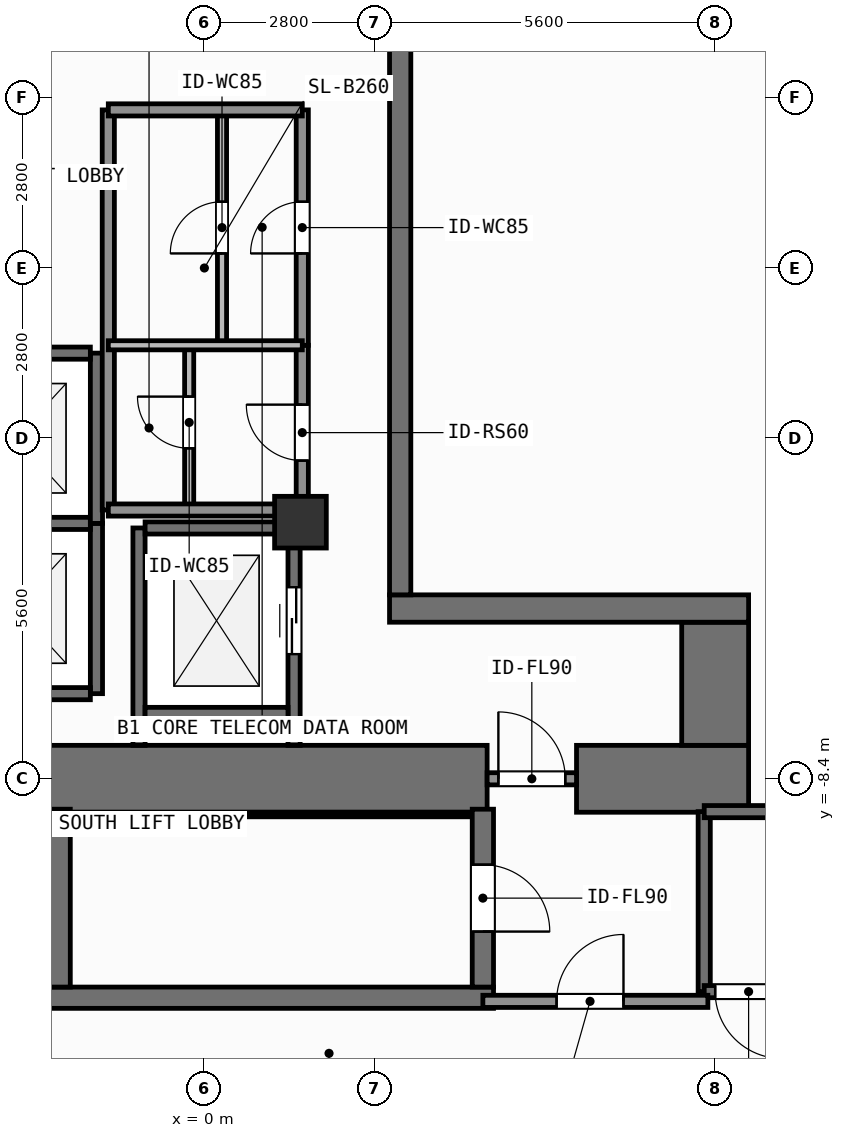
"""IFC4 building model, lengths in metres.
Left out: names, types, materials, properties, quantities, classifications, styles, units other than length and angle.
Written with IfcOpenShell. Run it as: python <this file> out.ifc"""

import sys

from ifc_helpers import new_model, si_unit, direction, frame, frame_2d, origin, origin_2d, place, context, subcontext, project, spatial, rectangle, extrude, element, fill, save


model = new_model("IFC4")
c1 = context("Model", 3, precision=1e-05, world=origin(), true_north=direction((0.0, 1.0)))
c2 = subcontext(c1, "Body", "Model", "MODEL_VIEW")
j1 = project(units=[si_unit("LENGTHUNIT", "METRE"), si_unit("PLANEANGLEUNIT", "RADIAN")], contexts=[c1])
p1 = place(None, origin())
s1 = spatial("IfcSite", under=j1, at=p1, CompositionType="ELEMENT")
p2 = place(p1, origin())
s2 = spatial("IfcBuilding", under=s1, at=p2, CompositionType="ELEMENT")
p3 = place(p2, frame((0.0, 0.0, -4.2)))
s3 = spatial("IfcBuildingStorey", under=s2, at=p3, CompositionType="ELEMENT", Elevation=-4.2)
p4 = place(p3, frame((-2.62, -8.4, 0.0), z_axis=(0.0, 0.0, 1.0), x_axis=(1.0, 0.0, 0.0)))
e1 = element("IfcWall", 1, at=p4, inside=s3, PredefinedType="SHEAR", context=c2, shape_type="SweptSolid", body=[
    extrude(rectangle(XDim=7.27, YDim=1.1, at=frame_2d((3.635, 0.0))), origin(), (0.0, 0.0, 1.0), 4.2),
])
p5 = place(p3, frame((6.12, -8.4, 0.0), z_axis=(0.0, 0.0, 1.0), x_axis=(1.0, 0.0, 0.0)))
e2 = element("IfcWall", 2, at=p5, inside=s3, PredefinedType="SHEAR", context=c2, shape_type="SweptSolid", body=[
    extrude(rectangle(XDim=2.83, YDim=1.1, at=frame_2d((1.415, 0.0))), origin(), (0.0, 0.0, 1.0), 4.2),
])
p6 = place(p3, frame((8.4, -7.85, 0.0), z_axis=(0.0, 0.0, 1.0), x_axis=(0.0, 1.0, 0.0)))
e3 = element("IfcWall", 3, at=p6, inside=s3, PredefinedType="SHEAR", context=c2, shape_type="SweptSolid", body=[
    extrude(rectangle(XDim=2.025, YDim=1.1, at=frame_2d((1.013, 0.0))), origin(), (0.0, 0.0, 1.0), 4.2),
])
p7 = place(p3, frame((3.045, -5.6, 0.0), z_axis=(0.0, 0.0, 1.0), x_axis=(1.0, 0.0, 0.0)))
e4 = element("IfcWall", 4, at=p7, inside=s3, PredefinedType="SHEAR", context=c2, shape_type="SweptSolid", body=[
    extrude(rectangle(XDim=5.905, YDim=0.45, at=frame_2d((2.953, 0.0))), origin(), (0.0, 0.0, 1.0), 4.2),
])
p8 = place(p3, frame((3.22, -5.375, 0.0), z_axis=(0.0, 0.0, 1.0), x_axis=(0.0, 1.0, 0.0)))
e5 = element("IfcWall", 5, at=p8, inside=s3, PredefinedType="SHEAR", context=c2, shape_type="SweptSolid", body=[
    extrude(rectangle(XDim=10.75, YDim=0.35, at=frame_2d((5.375, 0.0))), origin(), (0.0, 0.0, 1.0), 4.2),
])
p9 = place(p3, frame((-2.555, -12.0, 0.0), z_axis=(0.0, 0.0, 1.0), x_axis=(1.0, 0.0, 0.0)))
e6 = element("IfcWall", 6, at=p9, inside=s3, PredefinedType="SHEAR", context=c2, shape_type="SweptSolid", body=[
    extrude(rectangle(XDim=7.31, YDim=0.35, at=frame_2d((3.655, 0.0))), origin(), (0.0, 0.0, 1.0), 4.2),
])
p10 = place(p3, frame((-2.2, -8.988, 0.0), z_axis=(0.0, 0.0, 1.0), x_axis=(1.0, 0.0, 0.0)))
e7 = element("IfcWall", 7, at=p10, inside=s3, PredefinedType="SHEAR", context=c2, shape_type="SweptSolid", body=[
    extrude(rectangle(XDim=6.6, YDim=0.075, at=frame_2d((3.3, 0.0))), origin(), (0.0, 0.0, 1.0), 4.2),
])
p11 = place(p3, frame((-2.38, -11.825, 0.0), z_axis=(0.0, 0.0, 1.0), x_axis=(0.0, 1.0, 0.0)))
e8 = element("IfcWall", 8, at=p11, inside=s3, PredefinedType="SHEAR", context=c2, shape_type="SweptSolid", body=[
    extrude(rectangle(XDim=2.925, YDim=0.35, at=frame_2d((1.462, 0.0))), origin(), (0.0, 0.0, 1.0), 4.2),
])
p12 = place(p3, frame((4.58, -8.9, 0.0), z_axis=(0.0, 0.0, 1.0), x_axis=(0.0, -1.0, 0.0)))
e9 = element("IfcWall", 9, at=p12, inside=s3, PredefinedType="SHEAR", context=c2, shape_type="SweptSolid", body=[
    extrude(rectangle(XDim=2.925, YDim=0.35, at=frame_2d((1.462, 0.0))), origin(), (0.0, 0.0, 1.0), 4.2),
])
p13 = place(p12, frame((0.913, 0.0, 0.0)))
e10 = element("IfcOpeningElement", 10, at=p13, cuts=e9, PredefinedType="OPENING", context=c2, shape_type="SweptSolid", body=[
    extrude(rectangle(XDim=1.1, YDim=2.15, at=frame_2d((0.55, 1.075))), frame((0.0, 0.185, 0.0), z_axis=(0.0, -1.0, 0.0), x_axis=(1.0, 0.0, 0.0)), (0.0, 0.0, 1.0), 0.37),
])
p14 = place(p3, frame((1.58, -4.18, 0.0), z_axis=(0.0, 0.0, 1.0), x_axis=(1.0, 0.0, 0.0)))
e11 = element("IfcColumn", 11, at=p14, inside=s3, PredefinedType="COLUMN", context=c2, shape_type="SweptSolid", body=[
    extrude(rectangle(XDim=0.85, YDim=0.85, at=origin_2d()), origin(), (0.0, 0.0, 1.0), 4.2),
])
p15 = place(p3, frame((-1.775, -7.0, 0.0), z_axis=(0.0, 0.0, 1.0), x_axis=(0.0, 1.0, 0.0)))
e12 = element("IfcWall", 12, at=p15, inside=s3, PredefinedType="SHEAR", context=c2, shape_type="SweptSolid", body=[
    extrude(rectangle(XDim=2.8, YDim=0.2, at=frame_2d((1.4, 0.0))), origin(), (0.0, 0.0, 1.0), 3.9),
])
p16 = place(p3, frame((-4.325, -7.0, 0.0), z_axis=(0.0, 0.0, 1.0), x_axis=(1.0, 0.0, 0.0)))
e13 = element("IfcWall", 13, at=p16, inside=s3, PredefinedType="SHEAR", context=c2, shape_type="SweptSolid", body=[
    extrude(rectangle(XDim=2.45, YDim=0.2, at=frame_2d((1.225, 0.0))), origin(), (0.0, 0.0, 1.0), 3.9),
])
p17 = place(p16, frame((0.675, 0.0, 0.0)))
e14 = element("IfcOpeningElement", 14, at=p17, cuts=e13, PredefinedType="OPENING", context=c2, shape_type="SweptSolid", body=[
    extrude(rectangle(XDim=1.1, YDim=2.2, at=frame_2d((0.55, 1.1))), frame((0.0, 0.11, 0.0), z_axis=(0.0, -1.0, 0.0), x_axis=(1.0, 0.0, 0.0)), (0.0, 0.0, 1.0), 0.22),
])
p18 = place(p3, frame((-4.325, -4.2, 0.0), z_axis=(0.0, 0.0, 1.0), x_axis=(1.0, 0.0, 0.0)))
e15 = element("IfcWall", 15, at=p18, inside=s3, PredefinedType="SHEAR", context=c2, shape_type="SweptSolid", body=[
    extrude(rectangle(XDim=2.45, YDim=0.2, at=frame_2d((1.225, 0.0))), origin(), (0.0, 0.0, 1.0), 3.9),
])
p19 = place(p3, frame((-1.775, -4.2, 0.0), z_axis=(0.0, 0.0, 1.0), x_axis=(0.0, 1.0, 0.0)))
e16 = element("IfcWall", 16, at=p19, inside=s3, PredefinedType="SHEAR", context=c2, shape_type="SweptSolid", body=[
    extrude(rectangle(XDim=2.8, YDim=0.2, at=frame_2d((1.4, 0.0))), origin(), (0.0, 0.0, 1.0), 3.9),
])
p20 = place(p3, frame((-4.325, -1.4, 0.0), z_axis=(0.0, 0.0, 1.0), x_axis=(1.0, 0.0, 0.0)))
e17 = element("IfcWall", 17, at=p20, inside=s3, PredefinedType="SHEAR", context=c2, shape_type="SweptSolid", body=[
    extrude(rectangle(XDim=2.45, YDim=0.2, at=frame_2d((1.225, 0.0))), origin(), (0.0, 0.0, 1.0), 3.9),
])
p21 = place(p20, frame((0.675, 0.0, 0.0)))
e18 = element("IfcOpeningElement", 18, at=p21, cuts=e17, PredefinedType="OPENING", context=c2, shape_type="SweptSolid", body=[
    extrude(rectangle(XDim=1.1, YDim=2.2, at=frame_2d((0.55, 1.1))), frame((0.0, 0.11, 0.0), z_axis=(0.0, -1.0, 0.0), x_axis=(1.0, 0.0, 0.0)), (0.0, 0.0, 1.0), 0.22),
])
p22 = place(p3, frame((-1.075, -7.85, 0.0), z_axis=(0.0, 0.0, 1.0), x_axis=(0.0, 1.0, 0.0)))
e19 = element("IfcWall", 19, at=p22, inside=s3, PredefinedType="SHEAR", context=c2, shape_type="SweptSolid", body=[
    extrude(rectangle(XDim=3.575, YDim=0.2, at=frame_2d((1.788, 0.0))), origin(), (0.0, 0.0, 1.0), 3.9),
])
p23 = place(p3, frame((1.475, -7.85, 0.0), z_axis=(0.0, 0.0, 1.0), x_axis=(0.0, 1.0, 0.0)))
e20 = element("IfcWall", 20, at=p23, inside=s3, PredefinedType="SHEAR", context=c2, shape_type="SweptSolid", body=[
    extrude(rectangle(XDim=3.575, YDim=0.2, at=frame_2d((1.788, 0.0))), origin(), (0.0, 0.0, 1.0), 3.9),
])
p24 = place(p23, frame((1.5, 0.0, 0.0)))
e21 = element("IfcOpeningElement", 21, at=p24, cuts=e20, PredefinedType="OPENING", context=c2, shape_type="SweptSolid", body=[
    extrude(rectangle(XDim=1.1, YDim=2.2, at=frame_2d((0.55, 1.1))), frame((0.0, 0.11, 0.0), z_axis=(0.0, -1.0, 0.0), x_axis=(1.0, 0.0, 0.0)), (0.0, 0.0, 1.0), 0.22),
])
for number, where, z_axis, x_axis in (
    (22, (-0.975, -7.325, 0.0), (0.0, 0.0, 1.0), (1.0, 0.0, 0.0)),
    (23, (-0.975, -4.275, 0.0), (0.0, 0.0, 1.0), (1.0, 0.0, 0.0)),
):
    element("IfcWall", number, at=place(p3, frame(where, z_axis=z_axis, x_axis=x_axis)), inside=s3, PredefinedType="SHEAR", context=c2, shape_type="SweptSolid", body=[
        extrude(rectangle(XDim=2.35, YDim=0.2, at=frame_2d((1.175, 0.0))), origin(), (0.0, 0.0, 1.0), 3.9),
    ])
p25 = place(p3, frame((8.22, -11.9, 0.0), z_axis=(0.0, 0.0, 1.0), x_axis=(0.0, 1.0, 0.0)))
e24 = element("IfcWall", 24, at=p25, inside=s3, PredefinedType="SHEAR", context=c2, shape_type="SweptSolid", body=[
    extrude(rectangle(XDim=2.96, YDim=0.2, at=frame_2d((1.48, 0.0))), origin(), (0.0, 0.0, 1.0), 3.9),
])
p26 = place(p3, frame((14.38, -11.9, 0.0), z_axis=(0.0, 0.0, 1.0), x_axis=(-1.0, 0.0, 0.0)))
e25 = element("IfcWall", 25, at=p26, inside=s3, PredefinedType="SHEAR", context=c2, shape_type="SweptSolid", body=[
    extrude(rectangle(XDim=6.16, YDim=0.2, at=frame_2d((3.08, 0.0))), origin(), (0.0, 0.0, 1.0), 3.9),
])
p27 = place(p26, frame((4.88, 0.0, 0.0)))
e26 = element("IfcOpeningElement", 26, at=p27, cuts=e25, PredefinedType="OPENING", context=c2, shape_type="SweptSolid", body=[
    extrude(rectangle(XDim=1.1, YDim=2.15, at=frame_2d((0.55, 1.075))), frame((0.0, 0.11, 0.0), z_axis=(0.0, -1.0, 0.0), x_axis=(1.0, 0.0, 0.0)), (0.0, 0.0, 1.0), 0.22),
])
p28 = place(p3, frame((8.22, -8.94, 0.0), z_axis=(0.0, 0.0, 1.0), x_axis=(1.0, 0.0, 0.0)))
e27 = element("IfcWall", 27, at=p28, inside=s3, PredefinedType="SHEAR", context=c2, shape_type="SweptSolid", body=[
    extrude(rectangle(XDim=6.16, YDim=0.2, at=frame_2d((3.08, 0.0))), origin(), (0.0, 0.0, 1.0), 3.9),
])
p29 = place(p3, frame((4.58, -12.06, 0.0), z_axis=(0.0, 0.0, 1.0), x_axis=(1.0, 0.0, 0.0)))
e28 = element("IfcWall", 28, at=p29, inside=s3, PredefinedType="SOLIDWALL", context=c2, shape_type="SweptSolid", body=[
    extrude(rectangle(XDim=3.7, YDim=0.2, at=frame_2d((1.85, 0.0))), origin(), (0.0, 0.0, 1.0), 3.9),
])
p30 = place(p29, frame((1.212, 0.0, 0.0)))
e29 = element("IfcOpeningElement", 29, at=p30, cuts=e28, PredefinedType="OPENING", context=c2, shape_type="SweptSolid", body=[
    extrude(rectangle(XDim=1.1, YDim=2.15, at=frame_2d((0.55, 1.075))), frame((0.0, 0.11, 0.0), z_axis=(0.0, -1.0, 0.0), x_axis=(1.0, 0.0, 0.0)), (0.0, 0.0, 1.0), 0.22),
])
p31 = place(p3, frame((4.65, -8.4, 0.0), z_axis=(0.0, 0.0, 1.0), x_axis=(1.0, 0.0, 0.0)))
e30 = element("IfcWall", 30, at=p31, inside=s3, PredefinedType="SOLIDWALL", context=c2, shape_type="SweptSolid", body=[
    extrude(rectangle(XDim=1.47, YDim=0.2, at=frame_2d((0.735, 0.0))), origin(), (0.0, 0.0, 1.0), 2.94),
])
p32 = place(p31, frame((0.185, 0.0, 0.0)))
e31 = element("IfcOpeningElement", 31, at=p32, cuts=e30, PredefinedType="OPENING", context=c2, shape_type="SweptSolid", body=[
    extrude(rectangle(XDim=1.1, YDim=2.15, at=frame_2d((0.55, 1.075))), frame((0.0, 0.11, 0.0), z_axis=(0.0, -1.0, 0.0), x_axis=(1.0, 0.0, 0.0)), (0.0, 0.0, 1.0), 0.22),
])
p33 = place(p3, frame((-0.25, -3.98, 0.0), z_axis=(0.0, 0.0, 1.0), x_axis=(0.0, 1.0, 0.0)))
e32 = element("IfcWall", 32, at=p33, inside=s3, PredefinedType="PARTITIONING", context=c2, shape_type="SweptSolid", body=[
    extrude(rectangle(XDim=2.709, YDim=0.15, at=frame_2d((1.354, 0.0))), origin(), (0.0, 0.0, 1.0), 3.9),
])
p34 = place(p33, frame((1.015, 0.0, 0.0)))
e33 = element("IfcOpeningElement", 33, at=p34, cuts=e32, PredefinedType="OPENING", context=c2, shape_type="SweptSolid", body=[
    extrude(rectangle(XDim=0.85, YDim=2.1, at=frame_2d((0.425, 1.05))), frame((0.0, 0.085, 0.0), z_axis=(0.0, -1.0, 0.0), x_axis=(1.0, 0.0, 0.0)), (0.0, 0.0, 1.0), 0.17),
])
p35 = place(p3, frame((0.29, -1.271, 0.0), z_axis=(0.0, 0.0, 1.0), x_axis=(0.0, 1.0, 0.0)))
e34 = element("IfcWall", 34, at=p35, inside=s3, PredefinedType="PARTITIONING", context=c2, shape_type="SweptSolid", body=[
    extrude(rectangle(XDim=3.871, YDim=0.15, at=frame_2d((1.936, 0.0))), origin(), (0.0, 0.0, 1.0), 3.9),
])
p36 = place(p35, frame((1.51, 0.0, 0.0)))
e35 = element("IfcOpeningElement", 35, at=p36, cuts=e34, PredefinedType="OPENING", context=c2, shape_type="SweptSolid", body=[
    extrude(rectangle(XDim=0.85, YDim=2.1, at=frame_2d((0.425, 1.05))), frame((0.0, 0.085, 0.0), z_axis=(0.0, -1.0, 0.0), x_axis=(1.0, 0.0, 0.0)), (0.0, 0.0, 1.0), 0.17),
])
p37 = place(p3, frame((1.61, -3.98, 0.0), z_axis=(0.0, 0.0, 1.0), x_axis=(0.0, 1.0, 0.0)))
e36 = element("IfcWall", 36, at=p37, inside=s3, PredefinedType="SOLIDWALL", context=c2, shape_type="SweptSolid", body=[
    extrude(rectangle(XDim=2.709, YDim=0.2, at=frame_2d((1.354, 0.0))), origin(), (0.0, 0.0, 1.0), 3.9),
])
p38 = place(p37, frame((0.813, 0.0, 0.0)))
e37 = element("IfcOpeningElement", 37, at=p38, cuts=e36, PredefinedType="OPENING", context=c2, shape_type="SweptSolid", body=[
    extrude(rectangle(XDim=0.92, YDim=2.1, at=frame_2d((0.46, 1.05))), frame((0.0, 0.11, 0.0), z_axis=(0.0, -1.0, 0.0), x_axis=(1.0, 0.0, 0.0)), (0.0, 0.0, 1.0), 0.22),
])
p39 = place(p3, frame((1.61, -1.271, 0.0), z_axis=(0.0, 0.0, 1.0), x_axis=(0.0, 1.0, 0.0)))
e38 = element("IfcWall", 38, at=p39, inside=s3, PredefinedType="SOLIDWALL", context=c2, shape_type="SweptSolid", body=[
    extrude(rectangle(XDim=3.871, YDim=0.2, at=frame_2d((1.936, 0.0))), origin(), (0.0, 0.0, 1.0), 3.9),
])
p40 = place(p39, frame((1.51, 0.0, 0.0)))
e39 = element("IfcOpeningElement", 39, at=p40, cuts=e38, PredefinedType="OPENING", context=c2, shape_type="SweptSolid", body=[
    extrude(rectangle(XDim=0.85, YDim=2.1, at=frame_2d((0.425, 1.05))), frame((0.0, 0.11, 0.0), z_axis=(0.0, -1.0, 0.0), x_axis=(1.0, 0.0, 0.0)), (0.0, 0.0, 1.0), 0.22),
])
p41 = place(p3, frame((-1.58, -3.98, 0.0), z_axis=(0.0, 0.0, 1.0), x_axis=(0.0, 1.0, 0.0)))
e40 = element("IfcWall", 40, at=p41, inside=s3, PredefinedType="SOLIDWALL", context=c2, shape_type="SweptSolid", body=[
    extrude(rectangle(XDim=6.58, YDim=0.2, at=frame_2d((3.29, 0.0))), origin(), (0.0, 0.0, 1.0), 3.9),
])
for number, where, z_axis, x_axis in (
    (41, (-1.58, -3.98, 0.0), (0.0, 0.0, 1.0), (1.0, 0.0, 0.0)),
    (42, (-1.58, 2.6, 0.0), (0.0, 0.0, 1.0), (1.0, 0.0, 0.0)),
):
    element("IfcWall", number, at=place(p3, frame(where, z_axis=z_axis, x_axis=x_axis)), inside=s3, PredefinedType="SOLIDWALL", context=c2, shape_type="SweptSolid", body=[
        extrude(rectangle(XDim=3.19, YDim=0.2, at=frame_2d((1.595, 0.0))), origin(), (0.0, 0.0, 1.0), 3.9),
    ])
p42 = place(p3, frame((-1.58, -1.271, 0.0), z_axis=(0.0, 0.0, 1.0), x_axis=(1.0, 0.0, 0.0)))
e43 = element("IfcWall", 43, at=p42, inside=s3, PredefinedType="PARTITIONING", context=c2, shape_type="SweptSolid", body=[
    extrude(rectangle(XDim=3.19, YDim=0.15, at=frame_2d((1.595, 0.0))), origin(), (0.0, 0.0, 1.0), 3.9),
])
p43 = place(p24, origin())
e44 = element("IfcDoor", 44, at=p43, inside=s3, OperationType="SLIDING_TO_LEFT", PredefinedType="DOOR", context=c2, shape_type="SweptSolid", body=[
    extrude(rectangle(XDim=1.1, YDim=2.2, at=frame_2d((0.55, 1.1))), frame((0.0, 0.025, 0.0), z_axis=(0.0, -1.0, 0.0), x_axis=(1.0, 0.0, 0.0)), (0.0, 0.0, 1.0), 0.05),
])
fill(e21, e44)
p44 = place(p13, origin())
e45 = element("IfcDoor", 45, at=p44, inside=s3, OperationType="SINGLE_SWING_RIGHT", PredefinedType="DOOR", context=c2, shape_type="SweptSolid", body=[
    extrude(rectangle(XDim=1.1, YDim=2.15, at=frame_2d((0.55, 1.075))), frame((0.0, 0.025, 0.0), z_axis=(0.0, -1.0, 0.0), x_axis=(1.0, 0.0, 0.0)), (0.0, 0.0, 1.0), 0.05),
])
fill(e10, e45)
p45 = place(p27, origin())
e46 = element("IfcDoor", 46, at=p45, inside=s3, OperationType="SINGLE_SWING_LEFT", PredefinedType="DOOR", context=c2, shape_type="SweptSolid", body=[
    extrude(rectangle(XDim=1.1, YDim=2.15, at=frame_2d((0.55, 1.075))), frame((0.0, 0.025, 0.0), z_axis=(0.0, -1.0, 0.0), x_axis=(1.0, 0.0, 0.0)), (0.0, 0.0, 1.0), 0.05),
])
fill(e26, e46)
p46 = place(p30, origin())
e47 = element("IfcDoor", 47, at=p46, inside=s3, OperationType="SINGLE_SWING_RIGHT", PredefinedType="DOOR", context=c2, shape_type="SweptSolid", body=[
    extrude(rectangle(XDim=1.1, YDim=2.15, at=frame_2d((0.55, 1.075))), frame((0.0, 0.025, 0.0), z_axis=(0.0, -1.0, 0.0), x_axis=(1.0, 0.0, 0.0)), (0.0, 0.0, 1.0), 0.05),
])
fill(e29, e47)
p47 = place(p32, origin())
e48 = element("IfcDoor", 48, at=p47, inside=s3, OperationType="SINGLE_SWING_LEFT", PredefinedType="DOOR", context=c2, shape_type="SweptSolid", body=[
    extrude(rectangle(XDim=1.1, YDim=2.15, at=frame_2d((0.55, 1.075))), frame((0.0, 0.025, 0.0), z_axis=(0.0, -1.0, 0.0), x_axis=(1.0, 0.0, 0.0)), (0.0, 0.0, 1.0), 0.05),
])
fill(e31, e48)
p48 = place(p34, origin())
e49 = element("IfcDoor", 49, at=p48, inside=s3, OperationType="SINGLE_SWING_RIGHT", PredefinedType="DOOR", context=c2, shape_type="SweptSolid", body=[
    extrude(rectangle(XDim=0.85, YDim=2.1, at=frame_2d((0.425, 1.05))), frame((0.0, 0.025, 0.0), z_axis=(0.0, -1.0, 0.0), x_axis=(1.0, 0.0, 0.0)), (0.0, 0.0, 1.0), 0.05),
])
fill(e33, e49)
p49 = place(p36, origin())
e50 = element("IfcDoor", 50, at=p49, inside=s3, OperationType="SINGLE_SWING_LEFT", PredefinedType="DOOR", context=c2, shape_type="SweptSolid", body=[
    extrude(rectangle(XDim=0.85, YDim=2.1, at=frame_2d((0.425, 1.05))), frame((0.0, 0.025, 0.0), z_axis=(0.0, -1.0, 0.0), x_axis=(1.0, 0.0, 0.0)), (0.0, 0.0, 1.0), 0.05),
])
fill(e35, e50)
p50 = place(p38, origin())
e51 = element("IfcDoor", 51, at=p50, inside=s3, OperationType="SINGLE_SWING_RIGHT", PredefinedType="DOOR", context=c2, shape_type="SweptSolid", body=[
    extrude(rectangle(XDim=0.92, YDim=2.1, at=frame_2d((0.46, 1.05))), frame((0.0, 0.025, 0.0), z_axis=(0.0, -1.0, 0.0), x_axis=(1.0, 0.0, 0.0)), (0.0, 0.0, 1.0), 0.05),
])
fill(e37, e51)
p51 = place(p40, origin())
e52 = element("IfcDoor", 52, at=p51, inside=s3, OperationType="SINGLE_SWING_LEFT", PredefinedType="DOOR", context=c2, shape_type="SweptSolid", body=[
    extrude(rectangle(XDim=0.85, YDim=2.1, at=frame_2d((0.425, 1.05))), frame((0.0, 0.025, 0.0), z_axis=(0.0, -1.0, 0.0), x_axis=(1.0, 0.0, 0.0)), (0.0, 0.0, 1.0), 0.05),
])
fill(e39, e52)
save(model, sys.argv[1])
